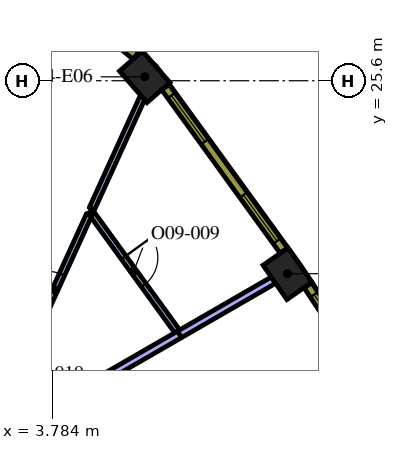
"""IFC4 building model, lengths in metres.
Left out: names, types, materials, properties, quantities, classifications, styles, units other than length and angle.
Written with IfcOpenShell. Run it as: python <this file> out.ifc"""

import sys

from ifc_helpers import new_model, si_unit, direction, frame, frame_2d, origin, origin_2d, place, context, subcontext, project, spatial, rectangle, extrude, element, fill, save


model = new_model("IFC4")
c1 = context("Model", 3, precision=1e-05, world=origin(), true_north=direction((0.0, 1.0)))
c2 = subcontext(c1, "Body", "Model", "MODEL_VIEW")
j1 = project(units=[si_unit("LENGTHUNIT", "METRE"), si_unit("PLANEANGLEUNIT", "RADIAN")], contexts=[c1])
p1 = place(None, origin())
s1 = spatial("IfcSite", under=j1, at=p1, CompositionType="ELEMENT")
p2 = place(p1, origin())
s2 = spatial("IfcBuilding", under=s1, at=p2, CompositionType="ELEMENT")
p3 = place(p2, frame((0.0, 0.0, 243.6)))
s3 = spatial("IfcBuildingStorey", under=s2, at=p3, CompositionType="ELEMENT", Elevation=243.6)
for number, where, z_axis, x_axis in (
    (1, (9.975, 20.522, 0.0), (0.0, 0.0, 1.0), (-0.57, 0.822, 0.0)),
    (2, (6.219, 25.703, 0.0), (0.0, 0.0, 1.0), (-0.657, 0.754, 0.0)),
):
    element("IfcColumn", number, at=place(p3, frame(where, z_axis=z_axis, x_axis=x_axis)), inside=s3, PredefinedType="COLUMN", context=c2, shape_type="SweptSolid", body=[
        extrude(rectangle(XDim=1.1, YDim=0.8, at=origin_2d()), origin(), (0.0, 0.0, 1.0), 4.2),
    ])
p4 = place(p3, frame((7.128, 18.922, 0.0), z_axis=(0.0, 0.0, 1.0), x_axis=(0.866023575777, 0.500003166188, 0.0)))
e3 = element("IfcWall", 3, at=p4, inside=s3, PredefinedType="PARTITIONING", context=c2, shape_type="SweptSolid", body=[
    extrude(rectangle(XDim=2.861, YDim=0.2, at=frame_2d((1.43, 0.0))), origin(), (0.0, 0.0, 1.0), 3.45),
])
p5 = place(p3, frame((4.111, 17.18, 0.0), z_axis=(0.0, 0.0, 1.0), x_axis=(0.866031916153, 0.499988720078, 0.0)))
e4 = element("IfcWall", 4, at=p5, inside=s3, PredefinedType="PARTITIONING", context=c2, shape_type="SweptSolid", body=[
    extrude(rectangle(XDim=3.492, YDim=0.2, at=frame_2d((1.746, 0.0))), origin(), (0.0, 0.0, 1.0), 3.45),
])
p6 = place(p3, frame((4.791, 22.152, 0.0), z_axis=(0.0, 0.0, 1.0), x_axis=(0.586987127968, -0.809596264567, 0.0)))
e5 = element("IfcWall", 5, at=p6, inside=s3, PredefinedType="PARTITIONING", context=c2, shape_type="SweptSolid", body=[
    extrude(rectangle(XDim=3.887, YDim=0.15, at=frame_2d((1.943, 0.0))), origin(), (0.0, 0.0, 1.0), 3.45),
])
p7 = place(p6, frame((1.487, 0.0, 0.0)))
e6 = element("IfcOpeningElement", 6, at=p7, cuts=e5, PredefinedType="OPENING", context=c2, shape_type="SweptSolid", body=[
    extrude(rectangle(XDim=0.9, YDim=2.1, at=frame_2d((0.45, 1.05))), frame((0.0, 0.085, 0.0), z_axis=(0.0, -1.0, 0.0), x_axis=(1.0, 0.0, 0.0)), (0.0, 0.0, 1.0), 0.17),
])
p8 = place(p3, frame((4.827, 22.23, 0.0), z_axis=(0.0, 0.0, 1.0), x_axis=(0.414339921123, 0.91012220595, 0.0)))
e7 = element("IfcWall", 7, at=p8, inside=s3, PredefinedType="PARTITIONING", context=c2, shape_type="SweptSolid", body=[
    extrude(rectangle(XDim=3.219, YDim=0.15, at=frame_2d((1.61, 0.0))), origin(), (0.0, 0.0, 1.0), 3.45),
])
p9 = place(p3, frame((3.129, 18.5, 0.0), z_axis=(0.0, 0.0, 1.0), x_axis=(0.414332290546, 0.910125679789, 0.0)))
e8 = element("IfcWall", 8, at=p9, inside=s3, PredefinedType="PARTITIONING", context=c2, shape_type="SweptSolid", body=[
    extrude(rectangle(XDim=3.926, YDim=0.15, at=frame_2d((1.963, 0.0))), origin(), (0.0, 0.0, 1.0), 3.45),
])
p10 = place(p9, frame((1.3, 0.0, 0.0)))
e9 = element("IfcOpeningElement", 9, at=p10, cuts=e8, PredefinedType="OPENING", context=c2, shape_type="SweptSolid", body=[
    extrude(rectangle(XDim=0.9, YDim=2.1, at=frame_2d((0.45, 1.05))), frame((0.0, 0.085, 0.0), z_axis=(0.0, -1.0, 0.0), x_axis=(1.0, 0.0, 0.0)), (0.0, 0.0, 1.0), 0.17),
])
p11 = place(p3, frame((4.061, 17.266, 0.0), z_axis=(0.0, 0.0, 1.0), x_axis=(-0.49995489152, 0.866051445611, 0.0)))
e10 = element("IfcWall", 10, at=p11, inside=s3, PredefinedType="PARTITIONING", context=c2, shape_type="SweptSolid", body=[
    extrude(rectangle(XDim=1.425, YDim=0.2, at=frame_2d((0.712, 0.0))), origin(), (0.0, 0.0, 1.0), 3.45),
])
p12 = place(p11, frame((0.2, 0.0, 0.0)))
e11 = element("IfcOpeningElement", 11, at=p12, cuts=e10, PredefinedType="OPENING", context=c2, shape_type="SweptSolid", body=[
    extrude(rectangle(XDim=1.0, YDim=2.1, at=frame_2d((0.5, 1.05))), frame((0.0, 0.11, 0.0), z_axis=(0.0, -1.0, 0.0), x_axis=(1.0, 0.0, 0.0)), (0.0, 0.0, 1.0), 0.22),
])
p13 = place(p3, frame((13.442, 15.803, 0.0), z_axis=(0.0, 0.0, 1.0), x_axis=(-0.552901821755, 0.833246407433, 0.0)))
e12 = element("IfcWall", 12, at=p13, inside=s3, PredefinedType="SOLIDWALL", context=c2, shape_type="SweptSolid", body=[
    extrude(rectangle(XDim=5.298, YDim=0.24, at=frame_2d((2.649, 0.0))), origin(), (0.0, 0.0, 1.0), 3.95),
])
p14 = place(p13, frame((0.295, 0.0, 0.9)))
e13 = element("IfcOpeningElement", 13, at=p14, cuts=e12, PredefinedType="OPENING", context=c2, shape_type="SweptSolid", body=[
    extrude(rectangle(XDim=1.5, YDim=2.55, at=frame_2d((0.75, 1.275))), frame((0.0, 0.13, 0.0), z_axis=(0.0, -1.0, 0.0), x_axis=(1.0, 0.0, 0.0)), (0.0, 0.0, 1.0), 0.26),
])
p15 = place(p13, frame((3.504, 0.0, 0.9)))
e14 = element("IfcOpeningElement", 14, at=p15, cuts=e12, PredefinedType="OPENING", context=c2, shape_type="SweptSolid", body=[
    extrude(rectangle(XDim=1.5, YDim=2.55, at=frame_2d((0.75, 1.275))), frame((0.0, 0.13, 0.0), z_axis=(0.0, -1.0, 0.0), x_axis=(1.0, 0.0, 0.0)), (0.0, 0.0, 1.0), 0.26),
])
p16 = place(p3, frame((9.878, 21.132, 0.0), z_axis=(0.0, 0.0, 1.0), x_axis=(-0.586998456641, 0.80958805074, 0.0)))
e15 = element("IfcWall", 15, at=p16, inside=s3, PredefinedType="SOLIDWALL", context=c2, shape_type="SweptSolid", body=[
    extrude(rectangle(XDim=5.311, YDim=0.24, at=frame_2d((2.655, 0.0))), origin(), (0.0, 0.0, 1.0), 3.95),
])
p17 = place(p16, frame((0.306, 0.0, 0.9)))
e16 = element("IfcOpeningElement", 16, at=p17, cuts=e15, PredefinedType="OPENING", context=c2, shape_type="SweptSolid", body=[
    extrude(rectangle(XDim=1.5, YDim=2.55, at=frame_2d((0.75, 1.275))), frame((0.0, 0.13, 0.0), z_axis=(0.0, -1.0, 0.0), x_axis=(1.0, 0.0, 0.0)), (0.0, 0.0, 1.0), 0.26),
])
p18 = place(p16, frame((3.539, 0.0, 0.9)))
e17 = element("IfcOpeningElement", 17, at=p18, cuts=e15, PredefinedType="OPENING", context=c2, shape_type="SweptSolid", body=[
    extrude(rectangle(XDim=1.5, YDim=2.55, at=frame_2d((0.75, 1.275))), frame((0.0, 0.13, 0.0), z_axis=(0.0, -1.0, 0.0), x_axis=(1.0, 0.0, 0.0)), (0.0, 0.0, 1.0), 0.26),
])
p19 = place(p3, frame((5.987, 26.259, 0.0), z_axis=(0.0, 0.0, 1.0), x_axis=(-0.769990037733, 0.638055908045, 0.0)))
e18 = element("IfcWall", 18, at=p19, inside=s3, PredefinedType="SOLIDWALL", context=c2, shape_type="SweptSolid", body=[
    extrude(rectangle(XDim=2.609, YDim=0.24, at=frame_2d((1.305, 0.0))), origin(), (0.0, 0.0, 1.0), 3.95),
])
p20 = place(p19, frame((0.805, 0.0, 0.9)))
e19 = element("IfcOpeningElement", 19, at=p20, cuts=e18, PredefinedType="OPENING", context=c2, shape_type="SweptSolid", body=[
    extrude(rectangle(XDim=1.0, YDim=2.55, at=frame_2d((0.5, 1.275))), frame((0.0, 0.13, 0.0), z_axis=(0.0, -1.0, 0.0), x_axis=(1.0, 0.0, 0.0)), (0.0, 0.0, 1.0), 0.26),
])
p21 = place(p7, origin())
e20 = element("IfcDoor", 20, at=p21, inside=s3, OperationType="SINGLE_SWING_LEFT", PredefinedType="DOOR", context=c2, shape_type="SweptSolid", body=[
    extrude(rectangle(XDim=0.9, YDim=2.1, at=frame_2d((0.45, 1.05))), frame((0.0, 0.025, 0.0), z_axis=(0.0, -1.0, 0.0), x_axis=(1.0, 0.0, 0.0)), (0.0, 0.0, 1.0), 0.05),
])
fill(e6, e20)
p22 = place(p12, origin())
e21 = element("IfcDoor", 21, at=p22, inside=s3, OperationType="SINGLE_SWING_LEFT", PredefinedType="DOOR", context=c2, shape_type="SweptSolid", body=[
    extrude(rectangle(XDim=1.0, YDim=2.1, at=frame_2d((0.5, 1.05))), frame((0.0, 0.025, 0.0), z_axis=(0.0, -1.0, 0.0), x_axis=(1.0, 0.0, 0.0)), (0.0, 0.0, 1.0), 0.05),
])
fill(e11, e21)
p23 = place(p10, origin())
e22 = element("IfcDoor", 22, at=p23, inside=s3, OperationType="SINGLE_SWING_LEFT", PredefinedType="DOOR", context=c2, shape_type="SweptSolid", body=[
    extrude(rectangle(XDim=0.9, YDim=2.1, at=frame_2d((0.45, 1.05))), frame((0.0, 0.025, 0.0), z_axis=(0.0, -1.0, 0.0), x_axis=(1.0, 0.0, 0.0)), (0.0, 0.0, 1.0), 0.05),
])
fill(e9, e22)
p24 = place(p15, origin())
e23 = element("IfcWindow", 23, at=p24, inside=s3, PartitioningType="SINGLE_PANEL", PredefinedType="WINDOW", context=c2, shape_type="SweptSolid", body=[
    extrude(rectangle(XDim=1.5, YDim=2.55, at=frame_2d((0.75, 1.275))), frame((0.0, 0.04, 0.0), z_axis=(0.0, -1.0, 0.0), x_axis=(1.0, 0.0, 0.0)), (0.0, 0.0, 1.0), 0.06),
])
fill(e14, e23)
p25 = place(p17, origin())
e24 = element("IfcWindow", 24, at=p25, inside=s3, PartitioningType="SINGLE_PANEL", PredefinedType="WINDOW", context=c2, shape_type="SweptSolid", body=[
    extrude(rectangle(XDim=1.5, YDim=2.55, at=frame_2d((0.75, 1.275))), frame((0.0, 0.04, 0.0), z_axis=(0.0, -1.0, 0.0), x_axis=(1.0, 0.0, 0.0)), (0.0, 0.0, 1.0), 0.06),
])
fill(e16, e24)
p26 = place(p18, origin())
e25 = element("IfcWindow", 25, at=p26, inside=s3, PartitioningType="SINGLE_PANEL", PredefinedType="WINDOW", context=c2, shape_type="SweptSolid", body=[
    extrude(rectangle(XDim=1.5, YDim=2.55, at=frame_2d((0.75, 1.275))), frame((0.0, 0.04, 0.0), z_axis=(0.0, -1.0, 0.0), x_axis=(1.0, 0.0, 0.0)), (0.0, 0.0, 1.0), 0.06),
])
fill(e17, e25)
save(model, sys.argv[1])
